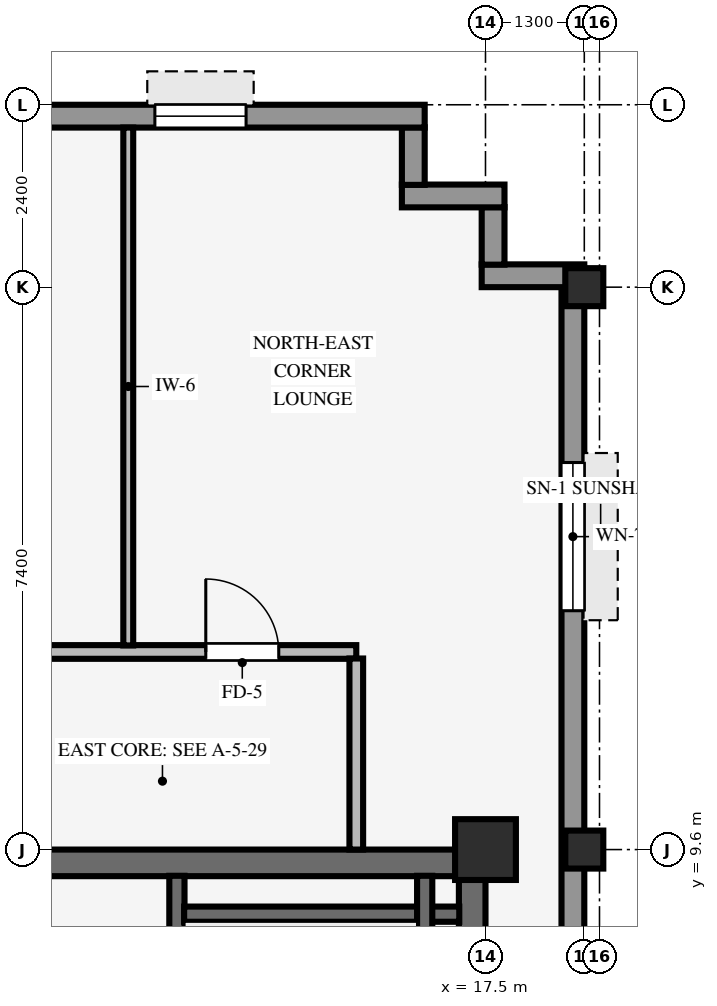
"""IFC4 building model, lengths in metres.
Left out: names, types, materials, properties, quantities, classifications, styles, units other than length and angle.
Written with IfcOpenShell. Run it as: python <this file> out.ifc"""

import sys

from ifc_helpers import new_model, si_unit, direction, frame, frame_2d, origin, origin_2d, place, context, subcontext, project, spatial, rectangle, hollow_rectangle, extrude, source, transform, mapped, element, fill, save


model = new_model("IFC4")
c1 = context("Model", 3, precision=1e-05, world=origin(), true_north=direction((0.0, 1.0)))
c2 = subcontext(c1, "Body", "Model", "MODEL_VIEW")
j1 = project(units=[si_unit("LENGTHUNIT", "METRE"), si_unit("PLANEANGLEUNIT", "RADIAN")], contexts=[c1])
p1 = place(None, origin())
s1 = spatial("IfcSite", under=j1, at=p1, CompositionType="ELEMENT")
p2 = place(p1, origin())
s2 = spatial("IfcBuilding", under=s1, at=p2, CompositionType="ELEMENT")
p3 = place(p2, frame((0.0, 0.0, 268.9)))
s3 = spatial("IfcBuildingStorey", under=s2, at=p3, CompositionType="ELEMENT", Elevation=268.9)
p4 = place(p3, frame((9.0, 9.425, 0.0), z_axis=(0.0, 0.0, 1.0), x_axis=(1.0, 0.0, 0.0)))
e1 = element("IfcWall", 1, at=p4, inside=s3, PredefinedType="SHEAR", context=c2, shape_type="SweptSolid", body=[
    extrude(rectangle(XDim=8.5, YDim=0.35, at=frame_2d((4.25, 0.0))), origin(), (0.0, 0.0, 1.0), 3.37),
])
p5 = place(p3, frame((17.325, -9.255, 0.0), z_axis=(0.0, 0.0, 1.0), x_axis=(0.0, 1.0, 0.0)))
e2 = element("IfcWall", 2, at=p5, inside=s3, PredefinedType="SHEAR", context=c2, shape_type="SweptSolid", body=[
    extrude(rectangle(XDim=18.51, YDim=0.35, at=frame_2d((9.255, 0.0))), origin(), (0.0, 0.0, 1.0), 3.37),
])
p6 = place(p3, frame((17.5, 9.6, 0.0), z_axis=(0.0, 0.0, 1.0), x_axis=(1.0, 0.0, 0.0)))
e3 = element("IfcColumn", 3, at=p6, inside=s3, PredefinedType="COLUMN", context=c2, shape_type="SweptSolid", body=[
    extrude(rectangle(XDim=0.8, YDim=0.8, at=origin_2d()), origin(), (0.0, 0.0, 1.0), 3.37),
])
for number, where, z_axis, x_axis in (
    (4, (18.8, 9.6, 0.0), (0.0, 0.0, 1.0), (1.0, 0.0, 0.0)),
    (5, (18.8, 17.0, 0.0), (0.0, 0.0, 1.0), (1.0, 0.0, 0.0)),
):
    element("IfcColumn", number, at=place(p3, frame(where, z_axis=z_axis, x_axis=x_axis)), inside=s3, PredefinedType="COLUMN", context=c2, shape_type="SweptSolid", body=[
        extrude(hollow_rectangle(XDim=0.5, YDim=0.5, WallThickness=0.032, InnerFilletRadius=0.032, OuterFilletRadius=0.064, at=origin_2d()), origin(), (0.0, 0.0, 1.0), 3.37),
    ])
p7 = place(p3, frame((18.65, -17.004, 0.0), z_axis=(0.0, 0.0, 1.0), x_axis=(0.0, 1.0, 0.0)))
e6 = element("IfcWall", 6, at=p7, inside=s3, PredefinedType="STANDARD", context=c2, shape_type="SweptSolid", body=[
    extrude(rectangle(XDim=34.008, YDim=0.3, at=frame_2d((17.004, 0.0))), origin(), (0.0, 0.0, 1.0), 2.705),
])
p8 = place(p7, frame((2.311, 0.0, 0.8)))
e7 = element("IfcOpeningElement", 7, at=p8, cuts=e6, PredefinedType="OPENING", context=c2, shape_type="SweptSolid", body=[
    extrude(rectangle(XDim=1.95, YDim=1.48, at=frame_2d((0.975, 0.74))), frame((0.0, 0.16, 0.0), z_axis=(0.0, -1.0, 0.0), x_axis=(1.0, 0.0, 0.0)), (0.0, 0.0, 1.0), 0.32),
])
p9 = place(p7, frame((29.747, 0.0, 0.8)))
e8 = element("IfcOpeningElement", 8, at=p9, cuts=e6, PredefinedType="OPENING", context=c2, shape_type="SweptSolid", body=[
    extrude(rectangle(XDim=1.95, YDim=1.48, at=frame_2d((0.975, 0.74))), frame((0.0, 0.16, 0.0), z_axis=(0.0, -1.0, 0.0), x_axis=(1.0, 0.0, 0.0)), (0.0, 0.0, 1.0), 0.32),
])
p10 = place(p3, frame((17.45, 17.15, 0.0), z_axis=(0.0, 0.0, 1.0), x_axis=(1.0, 0.0, 0.0)))
e9 = element("IfcWall", 9, at=p10, inside=s3, PredefinedType="STANDARD", context=c2, shape_type="SweptSolid", body=[
    extrude(rectangle(XDim=1.35, YDim=0.3, at=frame_2d((0.675, 0.0))), origin(), (0.0, 0.0, 1.0), 2.892),
])
p11 = place(p3, frame((17.6, 17.296, 0.0), z_axis=(0.0, 0.0, 1.0), x_axis=(0.0, 1.0, 0.0)))
e10 = element("IfcWall", 10, at=p11, inside=s3, PredefinedType="STANDARD", context=c2, shape_type="SweptSolid", body=[
    extrude(rectangle(XDim=0.758, YDim=0.3, at=frame_2d((0.379, 0.0))), origin(), (0.0, 0.0, 1.0), 2.892),
])
p12 = place(p3, frame((16.4, 18.2, 0.0), z_axis=(0.0, 0.0, 1.0), x_axis=(1.0, 0.0, 0.0)))
e11 = element("IfcWall", 11, at=p12, inside=s3, PredefinedType="STANDARD", context=c2, shape_type="SweptSolid", body=[
    extrude(rectangle(XDim=1.35, YDim=0.3, at=frame_2d((0.675, 0.0))), origin(), (0.0, 0.0, 1.0), 2.892),
])
p13 = place(p3, frame((16.55, 18.346, 0.0), z_axis=(0.0, 0.0, 1.0), x_axis=(0.0, 1.0, 0.0)))
e12 = element("IfcWall", 12, at=p13, inside=s3, PredefinedType="STANDARD", context=c2, shape_type="SweptSolid", body=[
    extrude(rectangle(XDim=0.758, YDim=0.3, at=frame_2d((0.379, 0.0))), origin(), (0.0, 0.0, 1.0), 2.892),
])
p14 = place(p3, frame((-18.9, 19.25, 0.0), z_axis=(0.0, 0.0, 1.0), x_axis=(1.0, 0.0, 0.0)))
e13 = element("IfcWall", 13, at=p14, inside=s3, PredefinedType="STANDARD", context=c2, shape_type="SweptSolid", body=[
    extrude(rectangle(XDim=35.6, YDim=0.3, at=frame_2d((17.8, 0.0))), origin(), (0.0, 0.0, 1.0), 2.705),
])
p15 = place(p14, frame((13.5, 0.0, 0.0)))
e14 = element("IfcOpeningElement", 14, at=p15, cuts=e13, PredefinedType="OPENING", context=c2, shape_type="SweptSolid", body=[
    extrude(rectangle(XDim=1.05, YDim=2.1, at=frame_2d((0.525, 1.05))), frame((0.0, 0.16, 0.0), z_axis=(0.0, -1.0, 0.0), x_axis=(1.0, 0.0, 0.0)), (0.0, 0.0, 1.0), 0.32),
])
p16 = place(p14, frame((3.7, 0.0, 0.8)))
e15 = element("IfcOpeningElement", 15, at=p16, cuts=e13, PredefinedType="OPENING", context=c2, shape_type="SweptSolid", body=[
    extrude(rectangle(XDim=1.2, YDim=1.48, at=frame_2d((0.6, 0.74))), frame((0.0, 0.16, 0.0), z_axis=(0.0, -1.0, 0.0), x_axis=(1.0, 0.0, 0.0)), (0.0, 0.0, 1.0), 0.32),
])
p17 = place(p14, frame((16.75, 0.0, 0.8)))
e16 = element("IfcOpeningElement", 16, at=p17, cuts=e13, PredefinedType="OPENING", context=c2, shape_type="SweptSolid", body=[
    extrude(rectangle(XDim=1.2, YDim=1.48, at=frame_2d((0.6, 0.74))), frame((0.0, 0.16, 0.0), z_axis=(0.0, -1.0, 0.0), x_axis=(1.0, 0.0, 0.0)), (0.0, 0.0, 1.0), 0.32),
])
p18 = place(p14, frame((22.0, 0.0, 0.8)))
e17 = element("IfcOpeningElement", 17, at=p18, cuts=e13, PredefinedType="OPENING", context=c2, shape_type="SweptSolid", body=[
    extrude(rectangle(XDim=1.2, YDim=1.48, at=frame_2d((0.6, 0.74))), frame((0.0, 0.16, 0.0), z_axis=(0.0, -1.0, 0.0), x_axis=(1.0, 0.0, 0.0)), (0.0, 0.0, 1.0), 0.32),
])
p19 = place(p14, frame((25.9, 0.0, 0.8)))
e18 = element("IfcOpeningElement", 18, at=p19, cuts=e13, PredefinedType="OPENING", context=c2, shape_type="SweptSolid", body=[
    extrude(rectangle(XDim=1.2, YDim=1.48, at=frame_2d((0.6, 0.74))), frame((0.0, 0.16, 0.0), z_axis=(0.0, -1.0, 0.0), x_axis=(1.0, 0.0, 0.0)), (0.0, 0.0, 1.0), 0.32),
])
p20 = place(p14, frame((32.05, 0.0, 0.8)))
e19 = element("IfcOpeningElement", 19, at=p20, cuts=e13, PredefinedType="OPENING", context=c2, shape_type="SweptSolid", body=[
    extrude(rectangle(XDim=1.2, YDim=1.48, at=frame_2d((0.6, 0.74))), frame((0.0, 0.16, 0.0), z_axis=(0.0, -1.0, 0.0), x_axis=(1.0, 0.0, 0.0)), (0.0, 0.0, 1.0), 0.32),
])
p21 = place(p3, frame((13.44, 0.9, 0.0), z_axis=(0.0, 0.0, 1.0), x_axis=(0.0, 1.0, 0.0)))
e20 = element("IfcWall", 20, at=p21, inside=s3, PredefinedType="SHEAR", context=c2, shape_type="SweptSolid", body=[
    extrude(rectangle(XDim=8.355, YDim=0.2, at=frame_2d((4.177, 0.0))), origin(), (0.0, 0.0, 1.0), 3.37),
])
p22 = place(p21, frame((0.43, 0.0, 0.0)))
e21 = element("IfcOpeningElement", 21, at=p22, cuts=e20, PredefinedType="OPENING", context=c2, shape_type="SweptSolid", body=[
    extrude(rectangle(XDim=1.1, YDim=2.15, at=frame_2d((0.55, 1.075))), frame((0.0, 0.11, 0.0), z_axis=(0.0, -1.0, 0.0), x_axis=(1.0, 0.0, 0.0)), (0.0, 0.0, 1.0), 0.22),
])
p23 = place(p3, frame((13.535, 8.75, 0.0), z_axis=(0.0, 0.0, 1.0), x_axis=(1.0, 0.0, 0.0)))
e22 = element("IfcWall", 22, at=p23, inside=s3, PredefinedType="SHEAR", context=c2, shape_type="SweptSolid", body=[
    extrude(rectangle(XDim=3.62, YDim=0.2, at=frame_2d((1.81, 0.0))), origin(), (0.0, 0.0, 1.0), 3.37),
])
p24 = place(p3, frame((16.7, 1.095, 0.0), z_axis=(0.0, 0.0, 1.0), x_axis=(0.0, 1.0, 0.0)))
e23 = element("IfcWall", 23, at=p24, inside=s3, PredefinedType="SHEAR", context=c2, shape_type="SweptSolid", body=[
    extrude(rectangle(XDim=8.16, YDim=0.2, at=frame_2d((4.08, 0.0))), origin(), (0.0, 0.0, 1.0), 3.37),
])
p25 = place(p3, frame((-15.0, 12.2, 0.0), z_axis=(0.0, 0.0, 1.0), x_axis=(1.0, 0.0, 0.0)))
e24 = element("IfcWall", 24, at=p25, inside=s3, PredefinedType="PARTITIONING", context=c2, shape_type="SweptSolid", body=[
    extrude(rectangle(XDim=30.8, YDim=0.18, at=frame_2d((15.4, 0.0))), origin(), (0.0, 0.0, 1.0), 3.36),
])
p26 = place(p25, frame((1.42, 0.0, 0.0)))
e25 = element("IfcOpeningElement", 25, at=p26, cuts=e24, PredefinedType="OPENING", context=c2, shape_type="SweptSolid", body=[
    extrude(rectangle(XDim=0.96, YDim=2.1, at=frame_2d((0.48, 1.05))), frame((0.0, 0.1, 0.0), z_axis=(0.0, -1.0, 0.0), x_axis=(1.0, 0.0, 0.0)), (0.0, 0.0, 1.0), 0.2),
])
p27 = place(p25, frame((25.42, 0.0, 0.0)))
e26 = element("IfcOpeningElement", 26, at=p27, cuts=e24, PredefinedType="OPENING", context=c2, shape_type="SweptSolid", body=[
    extrude(rectangle(XDim=0.96, YDim=2.1, at=frame_2d((0.48, 1.05))), frame((0.0, 0.1, 0.0), z_axis=(0.0, -1.0, 0.0), x_axis=(1.0, 0.0, 0.0)), (0.0, 0.0, 1.0), 0.2),
])
p28 = place(p25, frame((19.22, 0.0, 0.0)))
e27 = element("IfcOpeningElement", 27, at=p28, cuts=e24, PredefinedType="OPENING", context=c2, shape_type="SweptSolid", body=[
    extrude(rectangle(XDim=0.96, YDim=2.1, at=frame_2d((0.48, 1.05))), frame((0.0, 0.1, 0.0), z_axis=(0.0, -1.0, 0.0), x_axis=(1.0, 0.0, 0.0)), (0.0, 0.0, 1.0), 0.2),
])
p29 = place(p25, frame((28.82, 0.0, 0.0)))
e28 = element("IfcOpeningElement", 28, at=p29, cuts=e24, PredefinedType="OPENING", context=c2, shape_type="SweptSolid", body=[
    extrude(rectangle(XDim=0.96, YDim=2.1, at=frame_2d((0.48, 1.05))), frame((0.0, 0.1, 0.0), z_axis=(0.0, -1.0, 0.0), x_axis=(1.0, 0.0, 0.0)), (0.0, 0.0, 1.0), 0.2),
])
p30 = place(p25, frame((9.35, 0.0, 0.0)))
e29 = element("IfcOpeningElement", 29, at=p30, cuts=e24, PredefinedType="OPENING", context=c2, shape_type="SweptSolid", body=[
    extrude(rectangle(XDim=0.9, YDim=2.1, at=frame_2d((0.45, 1.05))), frame((0.0, 0.1, 0.0), z_axis=(0.0, -1.0, 0.0), x_axis=(1.0, 0.0, 0.0)), (0.0, 0.0, 1.0), 0.2),
])
p31 = place(p25, frame((12.15, 0.0, 0.0)))
e30 = element("IfcOpeningElement", 30, at=p31, cuts=e24, PredefinedType="OPENING", context=c2, shape_type="SweptSolid", body=[
    extrude(rectangle(XDim=0.9, YDim=2.1, at=frame_2d((0.45, 1.05))), frame((0.0, 0.1, 0.0), z_axis=(0.0, -1.0, 0.0), x_axis=(1.0, 0.0, 0.0)), (0.0, 0.0, 1.0), 0.2),
])
p32 = place(p25, frame((6.72, 0.0, 0.0)))
e31 = element("IfcOpeningElement", 31, at=p32, cuts=e24, PredefinedType="OPENING", context=c2, shape_type="SweptSolid", body=[
    extrude(rectangle(XDim=0.96, YDim=2.1, at=frame_2d((0.48, 1.05))), frame((0.0, 0.1, 0.0), z_axis=(0.0, -1.0, 0.0), x_axis=(1.0, 0.0, 0.0)), (0.0, 0.0, 1.0), 0.2),
])
p33 = place(p25, frame((16.25, 0.0, 0.0)))
e32 = element("IfcOpeningElement", 32, at=p33, cuts=e24, PredefinedType="OPENING", context=c2, shape_type="SweptSolid", body=[
    extrude(rectangle(XDim=0.9, YDim=2.1, at=frame_2d((0.45, 1.05))), frame((0.0, 0.1, 0.0), z_axis=(0.0, -1.0, 0.0), x_axis=(1.0, 0.0, 0.0)), (0.0, 0.0, 1.0), 0.2),
])
p34 = place(p3, frame((12.8, 12.286, 0.0), z_axis=(0.0, 0.0, 1.0), x_axis=(0.0, 1.0, 0.0)))
e33 = element("IfcWall", 33, at=p34, inside=s3, PredefinedType="PARTITIONING", context=c2, shape_type="SweptSolid", body=[
    extrude(rectangle(XDim=6.814, YDim=0.13, at=frame_2d((3.407, 0.0))), origin(), (0.0, 0.0, 1.0), 3.36),
])
p35 = place(p3, frame((15.8, 9.6, 0.0), z_axis=(0.0, 0.0, 1.0), x_axis=(0.0, 1.0, 0.0)))
e34 = element("IfcWall", 34, at=p35, inside=s3, PredefinedType="PARTITIONING", context=c2, shape_type="SweptSolid", body=[
    extrude(rectangle(XDim=2.514, YDim=0.18, at=frame_2d((1.257, 0.0))), origin(), (0.0, 0.0, 1.0), 3.36),
])
m1 = source(origin(), c2, "Body", "SweptSolid", [
    extrude(rectangle(XDim=1.95, YDim=1.48, at=frame_2d((0.975, 0.74))), frame((0.0, 0.03, 0.0), z_axis=(0.0, -1.0, 0.0), x_axis=(1.0, 0.0, 0.0)), (0.0, 0.0, 1.0), 0.06),
])
p36 = place(p9, origin())
e35 = element("IfcWindow", 35, at=p36, inside=s3, PartitioningType="SINGLE_PANEL", PredefinedType="WINDOW", context=c2, shape_type="MappedRepresentation", body=[
    mapped(m1, transform((0.0, 0.0, 0.0), scale=1.0)),
])
fill(e8, e35)
m2 = source(origin(), c2, "Body", "SweptSolid", [
    extrude(rectangle(XDim=1.2, YDim=1.48, at=frame_2d((0.6, 0.74))), frame((0.0, 0.03, 0.0), z_axis=(0.0, -1.0, 0.0), x_axis=(1.0, 0.0, 0.0)), (0.0, 0.0, 1.0), 0.06),
])
p37 = place(p20, origin())
e36 = element("IfcWindow", 36, at=p37, inside=s3, PartitioningType="SINGLE_PANEL", PredefinedType="WINDOW", context=c2, shape_type="MappedRepresentation", body=[
    mapped(m2, transform((0.0, 0.0, 0.0), scale=1.0)),
])
fill(e19, e36)
m3 = source(origin(), c2, "Body", "SweptSolid", [
    extrude(rectangle(XDim=0.96, YDim=2.1, at=frame_2d((0.48, 1.05))), frame((0.0, 0.025, 0.0), z_axis=(0.0, -1.0, 0.0), x_axis=(1.0, 0.0, 0.0)), (0.0, 0.0, 1.0), 0.05),
])
p38 = place(p29, origin())
e37 = element("IfcDoor", 37, at=p38, inside=s3, OperationType="SINGLE_SWING_LEFT", PredefinedType="DOOR", context=c2, shape_type="MappedRepresentation", body=[
    mapped(m3, transform((0.0, 0.0, 0.0), scale=1.0)),
])
fill(e28, e37)
save(model, sys.argv[1])
